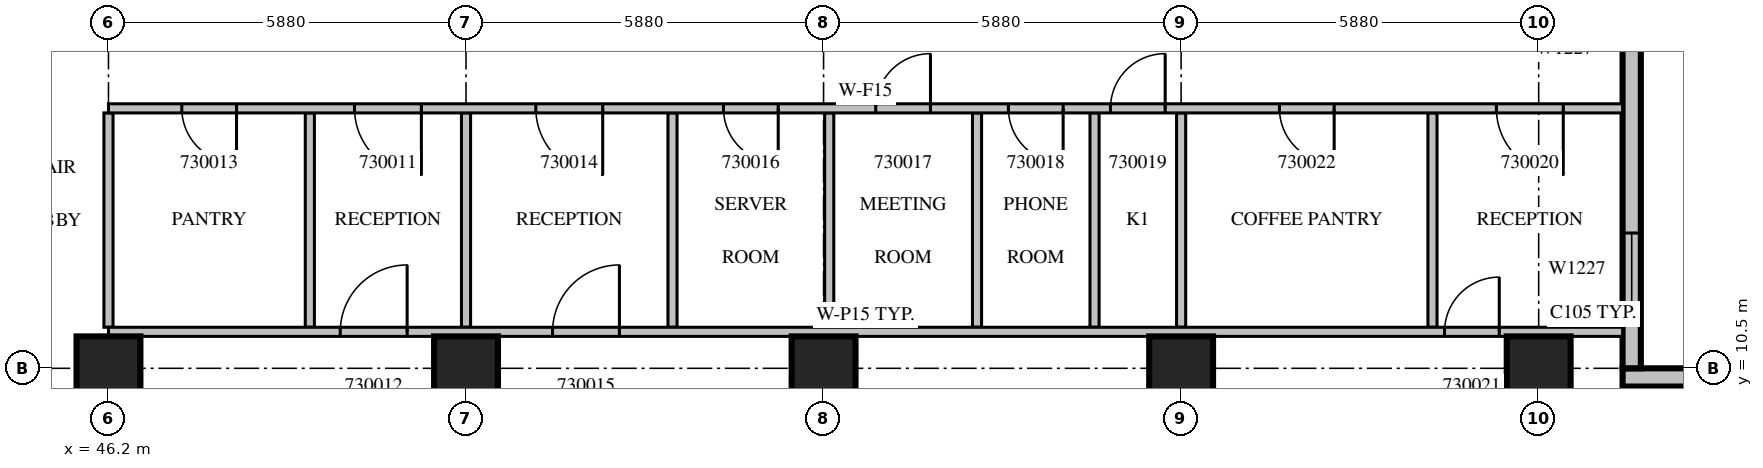
"""IFC4 building model, lengths in metres.
Left out: names, types, materials, properties, quantities, classifications, styles, units other than length and angle.
Written with IfcOpenShell. Run it as: python <this file> out.ifc"""

import sys

from ifc_helpers import new_model, si_unit, direction, frame, frame_2d, origin, origin_2d, place, context, subcontext, project, spatial, rectangle, extrude, source, transform, mapped, element, fill, save


model = new_model("IFC4")
c1 = context("Model", 3, precision=1e-05, world=origin(), true_north=direction((0.0, 1.0)))
c2 = subcontext(c1, "Body", "Model", "MODEL_VIEW")
j1 = project(units=[si_unit("LENGTHUNIT", "METRE"), si_unit("PLANEANGLEUNIT", "RADIAN")], contexts=[c1])
p1 = place(None, origin())
s1 = spatial("IfcSite", under=j1, at=p1, CompositionType="ELEMENT")
p2 = place(p1, origin())
s2 = spatial("IfcBuilding", under=s1, at=p2, CompositionType="ELEMENT")
p3 = place(p2, frame((0.0, 0.0, 137.1)))
s3 = spatial("IfcBuildingStorey", under=s2, at=p3, CompositionType="ELEMENT", Elevation=137.1)
m1 = source(origin(), c2, "Body", "SweptSolid", [
    extrude(rectangle(XDim=1.05, YDim=1.05, at=origin_2d()), origin(), (0.0, 0.0, 1.0), 4.2),
])
for number, where, z_axis, x_axis in (
    (1, (46.2, 10.5, 0.0), (0.0, 0.0, 1.0), (1.0, 0.0, 0.0)),
    (2, (52.08, 10.5, 0.0), (0.0, 0.0, 1.0), (1.0, 0.0, 0.0)),
    (3, (57.96, 10.5, 0.0), (0.0, 0.0, 1.0), (1.0, 0.0, 0.0)),
    (4, (63.84, 10.5, 0.0), (0.0, 0.0, 1.0), (1.0, 0.0, 0.0)),
    (5, (69.72, 10.5, 0.0), (0.0, 0.0, 1.0), (1.0, 0.0, 0.0)),
):
    element("IfcColumn", number, at=place(p3, frame(where, z_axis=z_axis, x_axis=x_axis)), inside=s3, PredefinedType="COLUMN", context=c2, shape_type="MappedRepresentation", body=[
        mapped(m1, transform((0.0, 0.0, 0.0), scale=1.0)),
    ])
m2 = source(origin(), c2, "Body", "SweptSolid", [
    extrude(rectangle(XDim=1.2, YDim=0.3, at=frame_2d((0.6, 0.0))), origin(), (0.0, 0.0, 1.0), 3.8),
])
p4 = place(p3, frame((71.1, 10.35, 0.0), z_axis=(0.0, 0.0, 1.0), x_axis=(1.0, 0.0, 0.0)))
e6 = element("IfcWall", 6, at=p4, inside=s3, PredefinedType="STANDARD", context=c2, shape_type="MappedRepresentation", body=[
    mapped(m2, transform((0.0, 0.0, 0.0), scale=1.0)),
])
m3 = source(origin(), c2, "Body", "SweptSolid", [
    extrude(rectangle(XDim=6.3, YDim=0.3, at=frame_2d((3.15, 0.0))), origin(), (0.0, 0.0, 1.0), 3.8),
])
p5 = place(p3, frame((71.25, 10.5, 0.0), z_axis=(0.0, 0.0, 1.0), x_axis=(0.0, 1.0, 0.0)))
e7 = element("IfcWall", 7, at=p5, inside=s3, PredefinedType="STANDARD", context=c2, shape_type="MappedRepresentation", body=[
    mapped(m3, transform((0.0, 0.0, 0.0), scale=1.0)),
])
m4 = source(origin(), c2, "Body", "SweptSolid", [
    extrude(rectangle(XDim=1.2, YDim=2.7, at=frame_2d((0.6, 1.35))), frame((0.0, 0.16, 0.0), z_axis=(0.0, -1.0, 0.0), x_axis=(1.0, 0.0, 0.0)), (0.0, 0.0, 1.0), 0.32),
])
p6 = place(p5, frame((1.025, 0.0, 0.6)))
e8 = element("IfcOpeningElement", 8, at=p6, cuts=e7, PredefinedType="OPENING", context=c2, shape_type="MappedRepresentation", body=[
    mapped(m4, transform((0.0, 0.0, 0.0), scale=1.0)),
])
m5 = source(origin(), c2, "Body", "SweptSolid", [
    extrude(rectangle(XDim=3.525, YDim=0.15, at=frame_2d((1.762, 0.0))), origin(), (0.0, 0.0, 1.0), 3.8),
])
for number, where, z_axis, x_axis in (
    (9, (49.512, 11.175, 0.0), (0.0, 0.0, 1.0), (0.0, 1.0, 0.0)),
    (10, (55.476, 11.175, 0.0), (0.0, 0.0, 1.0), (0.0, 1.0, 0.0)),
    (11, (58.053, 11.175, 0.0), (0.0, 0.0, 1.0), (0.0, 1.0, 0.0)),
    (12, (60.483, 11.175, 0.0), (0.0, 0.0, 1.0), (0.0, 1.0, 0.0)),
    (13, (62.416, 11.175, 0.0), (0.0, 0.0, 1.0), (0.0, 1.0, 0.0)),
    (14, (67.974, 11.175, 0.0), (0.0, 0.0, 1.0), (0.0, 1.0, 0.0)),
    (15, (46.2, 11.175, 0.0), (0.0, 0.0, 1.0), (0.0, 1.0, 0.0)),
    (16, (52.08, 11.175, 0.0), (0.0, 0.0, 1.0), (0.0, 1.0, 0.0)),
    (17, (63.84, 11.175, 0.0), (0.0, 0.0, 1.0), (0.0, 1.0, 0.0)),
):
    element("IfcWall", number, at=place(p3, frame(where, z_axis=z_axis, x_axis=x_axis)), inside=s3, PredefinedType="PARTITIONING", context=c2, shape_type="MappedRepresentation", body=[
        mapped(m5, transform((0.0, 0.0, 0.0), scale=1.0)),
    ])
m6 = source(origin(), c2, "Body", "SweptSolid", [
    extrude(rectangle(XDim=24.9, YDim=0.15, at=frame_2d((12.45, 0.0))), origin(), (0.0, 0.0, 1.0), 3.8),
])
p7 = place(p3, frame((71.1, 11.1, 0.0), z_axis=(0.0, 0.0, 1.0), x_axis=(-1.0, 0.0, 0.0)))
e18 = element("IfcWall", 18, at=p7, inside=s3, PredefinedType="PARTITIONING", context=c2, shape_type="MappedRepresentation", body=[
    mapped(m6, transform((0.0, 0.0, 0.0), scale=1.0)),
])
m7 = source(origin(), c2, "Body", "SweptSolid", [
    extrude(rectangle(XDim=1.1, YDim=2.1, at=frame_2d((0.55, 1.05))), frame((0.0, 0.085, 0.0), z_axis=(0.0, -1.0, 0.0), x_axis=(1.0, 0.0, 0.0)), (0.0, 0.0, 1.0), 0.17),
])
p8 = place(p7, frame((19.988, 0.0, 0.0)))
e19 = element("IfcOpeningElement", 19, at=p8, cuts=e18, PredefinedType="OPENING", context=c2, shape_type="MappedRepresentation", body=[
    mapped(m7, transform((0.0, 0.0, 0.0), scale=1.0)),
])
p9 = place(p7, frame((16.497, 0.0, 0.0)))
e20 = element("IfcOpeningElement", 20, at=p9, cuts=e18, PredefinedType="OPENING", context=c2, shape_type="MappedRepresentation", body=[
    mapped(m7, transform((0.0, 0.0, 0.0), scale=1.0)),
])
m8 = source(origin(), c2, "Body", "SweptSolid", [
    extrude(rectangle(XDim=0.9, YDim=2.1, at=frame_2d((0.45, 1.05))), frame((0.0, 0.085, 0.0), z_axis=(0.0, -1.0, 0.0), x_axis=(1.0, 0.0, 0.0)), (0.0, 0.0, 1.0), 0.17),
])
p10 = place(p7, frame((2.028, 0.0, 0.0)))
e21 = element("IfcOpeningElement", 21, at=p10, cuts=e18, PredefinedType="OPENING", context=c2, shape_type="MappedRepresentation", body=[
    mapped(m8, transform((0.0, 0.0, 0.0), scale=1.0)),
])
p11 = place(p3, frame((71.1, 14.775, 0.0), z_axis=(0.0, 0.0, 1.0), x_axis=(-1.0, 0.0, 0.0)))
e22 = element("IfcWall", 22, at=p11, inside=s3, PredefinedType="PARTITIONING", context=c2, shape_type="MappedRepresentation", body=[
    mapped(m6, transform((0.0, 0.0, 0.0), scale=1.0)),
])
p12 = place(p11, frame((19.754, 0.0, 0.0)))
e23 = element("IfcOpeningElement", 23, at=p12, cuts=e22, PredefinedType="OPENING", context=c2, shape_type="MappedRepresentation", body=[
    mapped(m7, transform((0.0, 0.0, 0.0), scale=1.0)),
])
p13 = place(p11, frame((22.794, 0.0, 0.0)))
e24 = element("IfcOpeningElement", 24, at=p13, cuts=e22, PredefinedType="OPENING", context=c2, shape_type="MappedRepresentation", body=[
    mapped(m8, transform((0.0, 0.0, 0.0), scale=1.0)),
])
p14 = place(p11, frame((16.772, 0.0, 0.0)))
e25 = element("IfcOpeningElement", 25, at=p14, cuts=e22, PredefinedType="OPENING", context=c2, shape_type="MappedRepresentation", body=[
    mapped(m7, transform((0.0, 0.0, 0.0), scale=1.0)),
])
p15 = place(p11, frame((13.886, 0.0, 0.0)))
e26 = element("IfcOpeningElement", 26, at=p15, cuts=e22, PredefinedType="OPENING", context=c2, shape_type="MappedRepresentation", body=[
    mapped(m8, transform((0.0, 0.0, 0.0), scale=1.0)),
])
p16 = place(p11, frame((11.382, 0.0, 0.0)))
e27 = element("IfcOpeningElement", 27, at=p16, cuts=e22, PredefinedType="OPENING", context=c2, shape_type="MappedRepresentation", body=[
    mapped(m8, transform((0.0, 0.0, 0.0), scale=1.0)),
])
p17 = place(p11, frame((9.2, 0.0, 0.0)))
e28 = element("IfcOpeningElement", 28, at=p17, cuts=e22, PredefinedType="OPENING", context=c2, shape_type="MappedRepresentation", body=[
    mapped(m8, transform((0.0, 0.0, 0.0), scale=1.0)),
])
p18 = place(p11, frame((7.522, 0.0, 0.0)))
e29 = element("IfcOpeningElement", 29, at=p18, cuts=e22, PredefinedType="OPENING", context=c2, shape_type="MappedRepresentation", body=[
    mapped(m8, transform((0.0, 0.0, 0.0), scale=1.0)),
])
p19 = place(p11, frame((0.976, 0.0, 0.0)))
e30 = element("IfcOpeningElement", 30, at=p19, cuts=e22, PredefinedType="OPENING", context=c2, shape_type="MappedRepresentation", body=[
    mapped(m7, transform((0.0, 0.0, 0.0), scale=1.0)),
])
p20 = place(p11, frame((4.743, 0.0, 0.0)))
e31 = element("IfcOpeningElement", 31, at=p20, cuts=e22, PredefinedType="OPENING", context=c2, shape_type="MappedRepresentation", body=[
    mapped(m8, transform((0.0, 0.0, 0.0), scale=1.0)),
])
m9 = source(origin(), c2, "Body", "SweptSolid", [
    extrude(rectangle(XDim=1.2, YDim=2.7, at=frame_2d((0.6, 1.35))), frame((0.0, 0.03, 0.0), z_axis=(0.0, -1.0, 0.0), x_axis=(1.0, 0.0, 0.0)), (0.0, 0.0, 1.0), 0.06),
])
p21 = place(p6, origin())
e32 = element("IfcWindow", 32, at=p21, inside=s3, PartitioningType="SINGLE_PANEL", PredefinedType="WINDOW", context=c2, shape_type="MappedRepresentation", body=[
    mapped(m9, transform((0.0, 0.0, 0.0), scale=1.0)),
])
fill(e8, e32)
m10 = source(origin(), c2, "Body", "SweptSolid", [
    extrude(rectangle(XDim=1.1, YDim=2.1, at=frame_2d((0.55, 1.05))), frame((0.0, 0.025, 0.0), z_axis=(0.0, -1.0, 0.0), x_axis=(1.0, 0.0, 0.0)), (0.0, 0.0, 1.0), 0.05),
])
p22 = place(p12, origin())
e33 = element("IfcDoor", 33, at=p22, inside=s3, OperationType="SINGLE_SWING_LEFT", PredefinedType="DOOR", context=c2, shape_type="MappedRepresentation", body=[
    mapped(m10, transform((0.0, 0.0, 0.0), scale=1.0)),
])
fill(e23, e33)
p23 = place(p8, origin())
e34 = element("IfcDoor", 34, at=p23, inside=s3, OperationType="SINGLE_SWING_RIGHT", PredefinedType="DOOR", context=c2, shape_type="MappedRepresentation", body=[
    mapped(m10, transform((0.0, 0.0, 0.0), scale=1.0)),
])
fill(e19, e34)
m11 = source(origin(), c2, "Body", "SweptSolid", [
    extrude(rectangle(XDim=0.9, YDim=2.1, at=frame_2d((0.45, 1.05))), frame((0.0, 0.025, 0.0), z_axis=(0.0, -1.0, 0.0), x_axis=(1.0, 0.0, 0.0)), (0.0, 0.0, 1.0), 0.05),
])
p24 = place(p13, origin())
e35 = element("IfcDoor", 35, at=p24, inside=s3, OperationType="SINGLE_SWING_LEFT", PredefinedType="DOOR", context=c2, shape_type="MappedRepresentation", body=[
    mapped(m11, transform((0.0, 0.0, 0.0), scale=1.0)),
])
fill(e24, e35)
p25 = place(p14, origin())
e36 = element("IfcDoor", 36, at=p25, inside=s3, OperationType="SINGLE_SWING_LEFT", PredefinedType="DOOR", context=c2, shape_type="MappedRepresentation", body=[
    mapped(m10, transform((0.0, 0.0, 0.0), scale=1.0)),
])
fill(e25, e36)
p26 = place(p9, origin())
e37 = element("IfcDoor", 37, at=p26, inside=s3, OperationType="SINGLE_SWING_RIGHT", PredefinedType="DOOR", context=c2, shape_type="MappedRepresentation", body=[
    mapped(m10, transform((0.0, 0.0, 0.0), scale=1.0)),
])
fill(e20, e37)
p27 = place(p15, origin())
e38 = element("IfcDoor", 38, at=p27, inside=s3, OperationType="SINGLE_SWING_LEFT", PredefinedType="DOOR", context=c2, shape_type="MappedRepresentation", body=[
    mapped(m11, transform((0.0, 0.0, 0.0), scale=1.0)),
])
fill(e26, e38)
p28 = place(p16, origin())
e39 = element("IfcDoor", 39, at=p28, inside=s3, OperationType="SINGLE_SWING_RIGHT", PredefinedType="DOOR", context=c2, shape_type="MappedRepresentation", body=[
    mapped(m11, transform((0.0, 0.0, 0.0), scale=1.0)),
])
fill(e27, e39)
p29 = place(p17, origin())
e40 = element("IfcDoor", 40, at=p29, inside=s3, OperationType="SINGLE_SWING_LEFT", PredefinedType="DOOR", context=c2, shape_type="MappedRepresentation", body=[
    mapped(m11, transform((0.0, 0.0, 0.0), scale=1.0)),
])
fill(e28, e40)
p30 = place(p18, origin())
e41 = element("IfcDoor", 41, at=p30, inside=s3, OperationType="SINGLE_SWING_RIGHT", PredefinedType="DOOR", context=c2, shape_type="MappedRepresentation", body=[
    mapped(m11, transform((0.0, 0.0, 0.0), scale=1.0)),
])
fill(e29, e41)
p31 = place(p19, origin())
e42 = element("IfcDoor", 42, at=p31, inside=s3, OperationType="SINGLE_SWING_LEFT", PredefinedType="DOOR", context=c2, shape_type="MappedRepresentation", body=[
    mapped(m10, transform((0.0, 0.0, 0.0), scale=1.0)),
])
fill(e30, e42)
p32 = place(p10, origin())
e43 = element("IfcDoor", 43, at=p32, inside=s3, OperationType="SINGLE_SWING_RIGHT", PredefinedType="DOOR", context=c2, shape_type="MappedRepresentation", body=[
    mapped(m11, transform((0.0, 0.0, 0.0), scale=1.0)),
])
fill(e21, e43)
p33 = place(p20, origin())
e44 = element("IfcDoor", 44, at=p33, inside=s3, OperationType="SINGLE_SWING_LEFT", PredefinedType="DOOR", context=c2, shape_type="MappedRepresentation", body=[
    mapped(m11, transform((0.0, 0.0, 0.0), scale=1.0)),
])
fill(e31, e44)
save(model, sys.argv[1])
